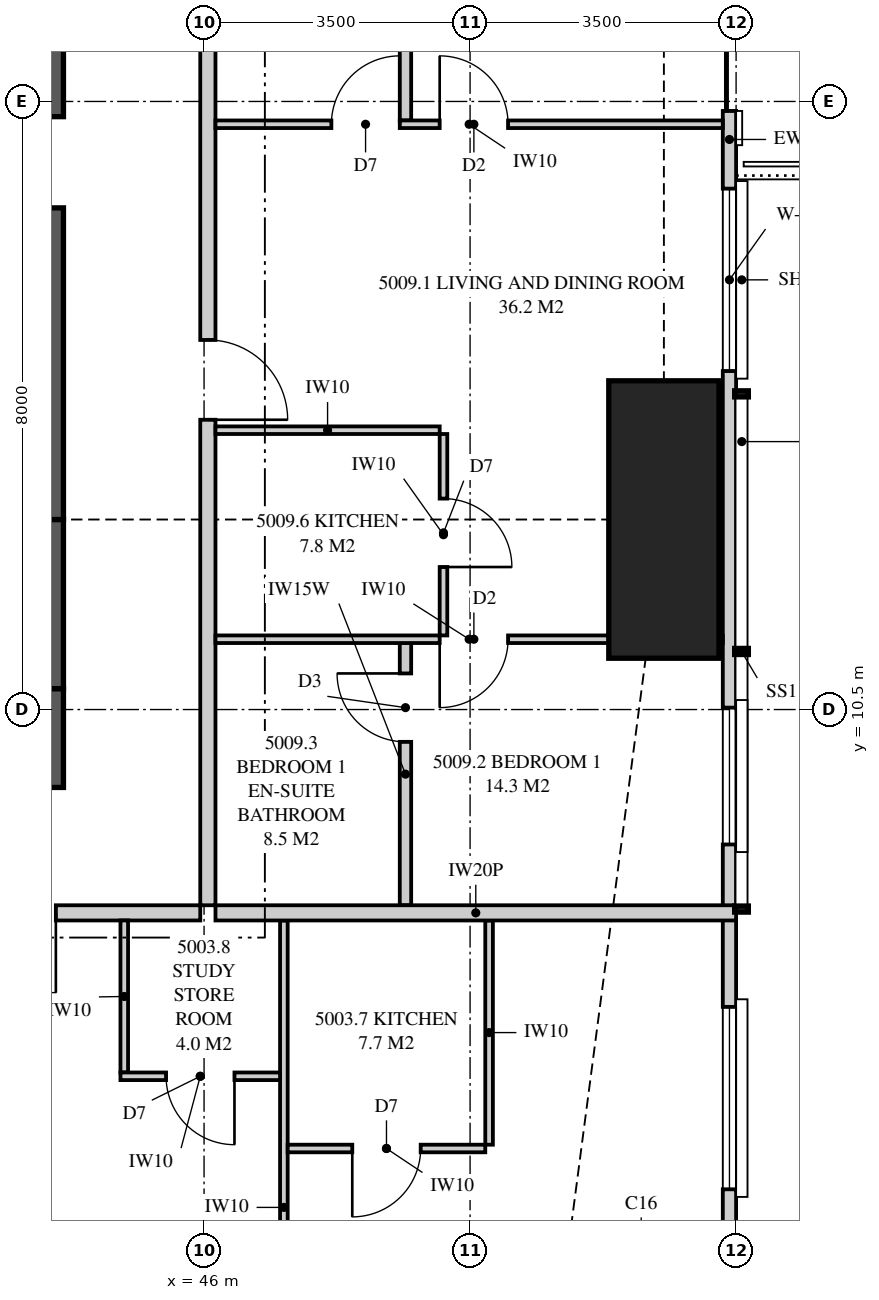
"""IFC4 building model, lengths in metres.
Left out: names, types, materials, properties, quantities, classifications, styles, units other than length and angle.
Written with IfcOpenShell. Run it as: python <this file> out.ifc"""

import sys

from ifc_helpers import new_model, si_unit, direction, frame, frame_2d, origin, origin_2d, place, context, subcontext, project, spatial, polyline, rectangle, outline, extrude, element, fill, save


model = new_model("IFC4")
c1 = context("Model", 3, precision=1e-05, world=origin(), true_north=direction((0.0, 1.0)))
c2 = subcontext(c1, "Body", "Model", "MODEL_VIEW")
j1 = project(units=[si_unit("LENGTHUNIT", "METRE"), si_unit("PLANEANGLEUNIT", "RADIAN")], contexts=[c1])
p1 = place(None, origin())
s1 = spatial("IfcSite", under=j1, at=p1, CompositionType="ELEMENT")
p2 = place(p1, origin())
s2 = spatial("IfcBuilding", under=s1, at=p2, CompositionType="ELEMENT")
p3 = place(p2, frame((0.0, 0.0, 184.5)))
s3 = spatial("IfcBuildingStorey", under=s2, at=p3, CompositionType="ELEMENT", Elevation=184.5)
p4 = place(p3, frame((52.05, 13.0, 0.0), z_axis=(0.0, 0.0, 1.0), x_axis=(1.0, 0.0, 0.0)))
e1 = element("IfcColumn", 1, at=p4, inside=s3, PredefinedType="COLUMN", context=c2, shape_type="SweptSolid", body=[
    extrude(rectangle(XDim=1.45, YDim=3.65, at=origin_2d()), origin(), (0.0, 0.0, 1.0), 3.35),
])
p5 = place(p3, frame((35.9, 10.125, 0.0), z_axis=(0.0, 0.0, 1.0), x_axis=(1.0, 0.0, 0.0)))
e2 = element("IfcWall", 2, at=p5, inside=s3, PredefinedType="SHEAR", context=c2, shape_type="SweptSolid", body=[
    extrude(rectangle(XDim=8.25, YDim=1.3, at=frame_2d((4.125, 0.0))), origin(), (0.0, 0.0, 1.0), 3.35),
])
p6 = place(p5, frame((2.7, 0.0, 0.0)))
e3 = element("IfcOpeningElement", 3, at=p6, cuts=e2, PredefinedType="OPENING", context=c2, shape_type="SweptSolid", body=[
    extrude(rectangle(XDim=1.0, YDim=2.1, at=frame_2d((0.5, 1.05))), frame((0.0, 0.66, 0.0), z_axis=(0.0, -1.0, 0.0), x_axis=(1.0, 0.0, 0.0)), (0.0, 0.0, 1.0), 1.32),
])
p7 = place(p3, frame((43.8, 10.775, 0.0), z_axis=(0.0, 0.0, 1.0), x_axis=(0.0, 1.0, 0.0)))
e4 = element("IfcWall", 4, at=p7, inside=s3, PredefinedType="SHEAR", context=c2, shape_type="SweptSolid", body=[
    extrude(rectangle(XDim=2.225, YDim=0.7, at=frame_2d((1.113, 0.0))), origin(), (0.0, 0.0, 1.0), 3.35),
])
p8 = place(p3, frame((43.8, 13.0, 0.0), z_axis=(0.0, 0.0, 1.0), x_axis=(0.0, 1.0, 0.0)))
e5 = element("IfcWall", 5, at=p8, inside=s3, PredefinedType="SHEAR", context=c2, shape_type="SweptSolid", body=[
    extrude(rectangle(XDim=6.3, YDim=0.7, at=frame_2d((3.15, 0.0))), origin(), (0.0, 0.0, 1.0), 3.35),
])
p9 = place(p8, frame((4.1, 0.0, 0.0)))
e6 = element("IfcOpeningElement", 6, at=p9, cuts=e5, PredefinedType="OPENING", context=c2, shape_type="SweptSolid", body=[
    extrude(rectangle(XDim=1.2, YDim=2.2, at=frame_2d((0.6, 1.1))), frame((0.0, 0.36, 0.0), z_axis=(0.0, -1.0, 0.0), x_axis=(1.0, 0.0, 0.0)), (0.0, 0.0, 1.0), 0.72),
])
p10 = place(p3, frame((52.913, 3.051, 0.0), z_axis=(0.0, 0.0, 1.0), x_axis=(0.0, 1.0, 0.0)))
e7 = element("IfcWall", 7, at=p10, inside=s3, PredefinedType="SOLIDWALL", context=c2, shape_type="SweptSolid", body=[
    extrude(outline(polyline([(0.0, 0.0), (29.897, 0.0), (29.897, 3.11), (22.167, 3.11), (22.167, 2.15), (22.074, 2.15), (22.074, 3.11), (21.949, 3.11), (21.949, 2.15), (9.949, 2.15), (9.949, 3.11), (9.847, 3.11), (9.847, 2.15), (9.706, 2.15), (9.706, 3.11), (0.0, 3.11), (0.0, 0.0)])), frame((0.0, 0.087, 0.0), z_axis=(0.0, -1.0, 0.0), x_axis=(1.0, 0.0, 0.0)), (0.0, 0.0, 1.0), 0.175),
])
p11 = place(p10, frame((1.137, 0.0, 0.4)))
e8 = element("IfcOpeningElement", 8, at=p11, cuts=e7, PredefinedType="OPENING", context=c2, shape_type="SweptSolid", body=[
    extrude(rectangle(XDim=2.4, YDim=1.7, at=frame_2d((1.2, 0.85))), frame((0.0, 0.097, 0.0), z_axis=(0.0, -1.0, 0.0), x_axis=(1.0, 0.0, 0.0)), (0.0, 0.0, 1.0), 0.195),
])
p12 = place(p10, frame((5.674, 0.0, 0.4)))
e9 = element("IfcOpeningElement", 9, at=p12, cuts=e7, PredefinedType="OPENING", context=c2, shape_type="SweptSolid", body=[
    extrude(rectangle(XDim=1.8, YDim=1.7, at=frame_2d((0.9, 0.85))), frame((0.0, 0.097, 0.0), z_axis=(0.0, -1.0, 0.0), x_axis=(1.0, 0.0, 0.0)), (0.0, 0.0, 1.0), 0.195),
])
p13 = place(p10, frame((11.902, 0.0, 0.4)))
e10 = element("IfcOpeningElement", 10, at=p13, cuts=e7, PredefinedType="OPENING", context=c2, shape_type="SweptSolid", body=[
    extrude(rectangle(XDim=2.4, YDim=1.7, at=frame_2d((1.2, 0.85))), frame((0.0, 0.097, 0.0), z_axis=(0.0, -1.0, 0.0), x_axis=(1.0, 0.0, 0.0)), (0.0, 0.0, 1.0), 0.195),
])
p14 = place(p10, frame((15.324, 0.0, 0.0)))
e11 = element("IfcOpeningElement", 11, at=p14, cuts=e7, PredefinedType="OPENING", context=c2, shape_type="SweptSolid", body=[
    extrude(rectangle(XDim=1.8, YDim=2.1, at=frame_2d((0.9, 1.05))), frame((0.0, 0.097, 0.0), z_axis=(0.0, -1.0, 0.0), x_axis=(1.0, 0.0, 0.0)), (0.0, 0.0, 1.0), 0.195),
])
p15 = place(p10, frame((23.874, 0.0, 0.4)))
e12 = element("IfcOpeningElement", 12, at=p15, cuts=e7, PredefinedType="OPENING", context=c2, shape_type="SweptSolid", body=[
    extrude(rectangle(XDim=1.8, YDim=1.7, at=frame_2d((0.9, 0.85))), frame((0.0, 0.097, 0.0), z_axis=(0.0, -1.0, 0.0), x_axis=(1.0, 0.0, 0.0)), (0.0, 0.0, 1.0), 0.195),
])
p16 = place(p10, frame((26.871, 0.0, 0.4)))
e13 = element("IfcOpeningElement", 13, at=p16, cuts=e7, PredefinedType="OPENING", context=c2, shape_type="SweptSolid", body=[
    extrude(rectangle(XDim=1.8, YDim=1.7, at=frame_2d((0.9, 0.85))), frame((0.0, 0.097, 0.0), z_axis=(0.0, -1.0, 0.0), x_axis=(1.0, 0.0, 0.0)), (0.0, 0.0, 1.0), 0.195),
])
p17 = place(p3, frame((34.1, 7.825, 0.0), z_axis=(0.0, 0.0, 1.0), x_axis=(1.0, 0.0, 0.0)))
e14 = element("IfcWall", 14, at=p17, inside=s3, PredefinedType="PARTITIONING", context=c2, shape_type="SweptSolid", body=[
    extrude(outline(polyline([(0.0, 0.0), (11.85, 0.0), (11.85, 3.11), (8.987, 3.11), (8.987, 2.541), (8.312, 2.541), (8.312, 3.11), (0.0, 3.11), (0.0, 0.0)])), frame((0.0, 0.1, 0.0), z_axis=(0.0, -1.0, 0.0), x_axis=(1.0, 0.0, 0.0)), (0.0, 0.0, 1.0), 0.2),
])
p18 = place(p17, frame((8.9, 0.0, 0.0)))
e15 = element("IfcOpeningElement", 15, at=p18, cuts=e14, PredefinedType="OPENING", context=c2, shape_type="SweptSolid", body=[
    extrude(rectangle(XDim=1.05, YDim=2.2, at=frame_2d((0.525, 1.1))), frame((0.0, 0.11, 0.0), z_axis=(0.0, -1.0, 0.0), x_axis=(1.0, 0.0, 0.0)), (0.0, 0.0, 1.0), 0.22),
])
p19 = place(p3, frame((47.05, 0.175, 0.0), z_axis=(0.0, 0.0, 1.0), x_axis=(0.0, 1.0, 0.0)))
e16 = element("IfcWall", 16, at=p19, inside=s3, PredefinedType="PARTITIONING", context=c2, shape_type="SweptSolid", body=[
    extrude(outline(polyline([(0.0, 0.0), (7.55, 0.0), (7.55, 3.11), (2.409, 3.11), (2.409, 2.15), (0.663, 2.15), (0.663, 3.11), (0.0, 3.11), (0.0, 0.0)])), frame((0.0, 0.05, 0.0), z_axis=(0.0, -1.0, 0.0), x_axis=(1.0, 0.0, 0.0)), (0.0, 0.0, 1.0), 0.1),
])
p20 = place(p19, frame((1.825, 0.0, 0.0)))
e17 = element("IfcOpeningElement", 17, at=p20, cuts=e16, PredefinedType="OPENING", context=c2, shape_type="SweptSolid", body=[
    extrude(rectangle(XDim=0.9, YDim=2.1, at=frame_2d((0.45, 1.05))), frame((0.0, 0.06, 0.0), z_axis=(0.0, -1.0, 0.0), x_axis=(1.0, 0.0, 0.0)), (0.0, 0.0, 1.0), 0.12),
])
p21 = place(p3, frame((47.1, 4.725, 0.0), z_axis=(0.0, 0.0, 1.0), x_axis=(1.0, 0.0, 0.0)))
e18 = element("IfcWall", 18, at=p21, inside=s3, PredefinedType="PARTITIONING", context=c2, shape_type="SweptSolid", body=[
    extrude(rectangle(XDim=2.6, YDim=0.1, at=frame_2d((1.3, 0.0))), origin(), (0.0, 0.0, 1.0), 3.11),
])
p22 = place(p21, frame((0.85, 0.0, 0.0)))
e19 = element("IfcOpeningElement", 19, at=p22, cuts=e18, PredefinedType="OPENING", context=c2, shape_type="SweptSolid", body=[
    extrude(rectangle(XDim=0.9, YDim=2.1, at=frame_2d((0.45, 1.05))), frame((0.0, 0.06, 0.0), z_axis=(0.0, -1.0, 0.0), x_axis=(1.0, 0.0, 0.0)), (0.0, 0.0, 1.0), 0.12),
])
p23 = place(p3, frame((49.75, 4.775, 0.0), z_axis=(0.0, 0.0, 1.0), x_axis=(0.0, 1.0, 0.0)))
e20 = element("IfcWall", 20, at=p23, inside=s3, PredefinedType="PARTITIONING", context=c2, shape_type="SweptSolid", body=[
    extrude(rectangle(XDim=2.95, YDim=0.1, at=frame_2d((1.475, 0.0))), origin(), (0.0, 0.0, 1.0), 3.11),
])
p24 = place(p3, frame((46.15, 7.825, 0.0), z_axis=(0.0, 0.0, 1.0), x_axis=(1.0, 0.0, 0.0)))
e21 = element("IfcWall", 21, at=p24, inside=s3, PredefinedType="PARTITIONING", context=c2, shape_type="SweptSolid", body=[
    extrude(outline(polyline([(0.0, 0.0), (6.85, 0.0), (6.85, 3.11), (6.138, 3.11), (6.138, 2.15), (4.303, 2.15), (4.303, 3.11), (0.0, 3.11), (0.0, 0.0)])), frame((0.0, 0.1, 0.0), z_axis=(0.0, -1.0, 0.0), x_axis=(1.0, 0.0, 0.0)), (0.0, 0.0, 1.0), 0.2),
])
p25 = place(p3, frame((46.05, 7.925, 0.0), z_axis=(0.0, 0.0, 1.0), x_axis=(0.0, 1.0, 0.0)))
e22 = element("IfcWall", 22, at=p25, inside=s3, PredefinedType="PARTITIONING", context=c2, shape_type="SweptSolid", body=[
    extrude(outline(polyline([(0.0, 0.0), (13.775, 0.0), (13.775, 3.11), (5.412, 3.11), (5.412, 2.541), (4.738, 2.541), (4.738, 3.11), (0.0, 3.11), (0.0, 0.0)])), frame((0.0, 0.1, 0.0), z_axis=(0.0, -1.0, 0.0), x_axis=(1.0, 0.0, 0.0)), (0.0, 0.0, 1.0), 0.2),
])
p26 = place(p25, frame((6.387, 0.0, 0.0)))
e23 = element("IfcOpeningElement", 23, at=p26, cuts=e22, PredefinedType="OPENING", context=c2, shape_type="SweptSolid", body=[
    extrude(rectangle(XDim=1.05, YDim=2.2, at=frame_2d((0.525, 1.1))), frame((0.0, 0.11, 0.0), z_axis=(0.0, -1.0, 0.0), x_axis=(1.0, 0.0, 0.0)), (0.0, 0.0, 1.0), 0.22),
])
p27 = place(p3, frame((52.825, 11.425, 0.0), z_axis=(0.0, 0.0, 1.0), x_axis=(-1.0, 0.0, 0.0)))
e24 = element("IfcWall", 24, at=p27, inside=s3, PredefinedType="PARTITIONING", context=c2, shape_type="SweptSolid", body=[
    extrude(outline(polyline([(0.0, 0.0), (6.675, 0.0), (6.675, 3.11), (1.849, 3.11), (1.849, 2.15), (0.115, 2.15), (0.115, 3.11), (0.0, 3.11), (0.0, 0.0)])), frame((0.0, 0.05, 0.0), z_axis=(0.0, -1.0, 0.0), x_axis=(1.0, 0.0, 0.0)), (0.0, 0.0, 1.0), 0.1),
])
p28 = place(p27, frame((2.825, 0.0, 0.0)))
e25 = element("IfcOpeningElement", 25, at=p28, cuts=e24, PredefinedType="OPENING", context=c2, shape_type="SweptSolid", body=[
    extrude(rectangle(XDim=0.9, YDim=2.1, at=frame_2d((0.45, 1.05))), frame((0.0, 0.06, 0.0), z_axis=(0.0, -1.0, 0.0), x_axis=(1.0, 0.0, 0.0)), (0.0, 0.0, 1.0), 0.12),
])
p29 = place(p3, frame((52.825, 18.2, 0.0), z_axis=(0.0, 0.0, 1.0), x_axis=(-1.0, 0.0, 0.0)))
e26 = element("IfcWall", 26, at=p29, inside=s3, PredefinedType="PARTITIONING", context=c2, shape_type="SweptSolid", body=[
    extrude(outline(polyline([(0.0, 0.0), (6.675, 0.0), (6.675, 3.11), (1.635, 3.11), (1.635, 2.15), (0.0, 2.15), (0.0, 3.11), (0.0, 0.0)])), frame((0.0, 0.05, 0.0), z_axis=(0.0, -1.0, 0.0), x_axis=(1.0, 0.0, 0.0)), (0.0, 0.0, 1.0), 0.1),
])
p30 = place(p29, frame((2.825, 0.0, 0.0)))
e27 = element("IfcOpeningElement", 27, at=p30, cuts=e26, PredefinedType="OPENING", context=c2, shape_type="SweptSolid", body=[
    extrude(rectangle(XDim=0.9, YDim=2.1, at=frame_2d((0.45, 1.05))), frame((0.0, 0.06, 0.0), z_axis=(0.0, -1.0, 0.0), x_axis=(1.0, 0.0, 0.0)), (0.0, 0.0, 1.0), 0.12),
])
p31 = place(p29, frame((4.25, 0.0, 0.0)))
e28 = element("IfcOpeningElement", 28, at=p31, cuts=e26, PredefinedType="OPENING", context=c2, shape_type="SweptSolid", body=[
    extrude(rectangle(XDim=0.9, YDim=2.1, at=frame_2d((0.45, 1.05))), frame((0.0, 0.06, 0.0), z_axis=(0.0, -1.0, 0.0), x_axis=(1.0, 0.0, 0.0)), (0.0, 0.0, 1.0), 0.12),
])
p32 = place(p3, frame((48.65, 7.925, 0.0), z_axis=(0.0, 0.0, 1.0), x_axis=(0.0, 1.0, 0.0)))
e29 = element("IfcWall", 29, at=p32, inside=s3, PredefinedType="PLUMBINGWALL", context=c2, shape_type="SweptSolid", body=[
    extrude(rectangle(XDim=3.45, YDim=0.15, at=frame_2d((1.725, 0.0))), origin(), (0.0, 0.0, 1.0), 3.11),
])
p33 = place(p32, frame((2.15, 0.0, 0.0)))
e30 = element("IfcOpeningElement", 30, at=p33, cuts=e29, PredefinedType="OPENING", context=c2, shape_type="SweptSolid", body=[
    extrude(rectangle(XDim=0.9, YDim=2.1, at=frame_2d((0.45, 1.05))), frame((0.0, 0.085, 0.0), z_axis=(0.0, -1.0, 0.0), x_axis=(1.0, 0.0, 0.0)), (0.0, 0.0, 1.0), 0.17),
])
p34 = place(p3, frame((48.65, 18.25, 0.0), z_axis=(0.0, 0.0, 1.0), x_axis=(0.0, 1.0, 0.0)))
e31 = element("IfcWall", 31, at=p34, inside=s3, PredefinedType="PLUMBINGWALL", context=c2, shape_type="SweptSolid", body=[
    extrude(rectangle(XDim=3.45, YDim=0.15, at=frame_2d((1.725, 0.0))), origin(), (0.0, 0.0, 1.0), 3.11),
])
p35 = place(p3, frame((49.15, 11.475, 0.0), z_axis=(0.0, 0.0, 1.0), x_axis=(0.0, 1.0, 0.0)))
e32 = element("IfcWall", 32, at=p35, inside=s3, PredefinedType="PARTITIONING", context=c2, shape_type="SweptSolid", body=[
    extrude(outline(polyline([(0.0, 0.0), (2.65, 0.0), (2.65, 3.11), (1.812, 3.11), (1.812, 2.541), (1.238, 2.541), (1.238, 3.11), (0.0, 3.11), (0.0, 0.0)])), frame((0.0, 0.05, 0.0), z_axis=(0.0, -1.0, 0.0), x_axis=(1.0, 0.0, 0.0)), (0.0, 0.0, 1.0), 0.1),
])
p36 = place(p35, frame((0.9, 0.0, 0.0)))
e33 = element("IfcOpeningElement", 33, at=p36, cuts=e32, PredefinedType="OPENING", context=c2, shape_type="SweptSolid", body=[
    extrude(rectangle(XDim=0.9, YDim=2.1, at=frame_2d((0.45, 1.05))), frame((0.0, 0.06, 0.0), z_axis=(0.0, -1.0, 0.0), x_axis=(1.0, 0.0, 0.0)), (0.0, 0.0, 1.0), 0.12),
])
p37 = place(p3, frame((49.1, 14.175, 0.0), z_axis=(0.0, 0.0, 1.0), x_axis=(-1.0, 0.0, 0.0)))
e34 = element("IfcWall", 34, at=p37, inside=s3, PredefinedType="PARTITIONING", context=c2, shape_type="SweptSolid", body=[
    extrude(rectangle(XDim=2.95, YDim=0.1, at=frame_2d((1.475, 0.0))), origin(), (0.0, 0.0, 1.0), 3.11),
])
p38 = place(p3, frame((47.0, 5.675, 0.0), z_axis=(0.0, 0.0, 1.0), x_axis=(-1.0, 0.0, 0.0)))
e35 = element("IfcWall", 35, at=p38, inside=s3, PredefinedType="PARTITIONING", context=c2, shape_type="SweptSolid", body=[
    extrude(rectangle(XDim=2.1, YDim=0.1, at=frame_2d((1.05, 0.0))), origin(), (0.0, 0.0, 1.0), 3.11),
])
p39 = place(p38, frame((0.6, 0.0, 0.0)))
e36 = element("IfcOpeningElement", 36, at=p39, cuts=e35, PredefinedType="OPENING", context=c2, shape_type="SweptSolid", body=[
    extrude(rectangle(XDim=0.9, YDim=2.1, at=frame_2d((0.45, 1.05))), frame((0.0, 0.06, 0.0), z_axis=(0.0, -1.0, 0.0), x_axis=(1.0, 0.0, 0.0)), (0.0, 0.0, 1.0), 0.12),
])
p40 = place(p3, frame((44.95, 7.725, 0.0), z_axis=(0.0, 0.0, 1.0), x_axis=(0.0, -1.0, 0.0)))
e37 = element("IfcWall", 37, at=p40, inside=s3, PredefinedType="PARTITIONING", context=c2, shape_type="SweptSolid", body=[
    extrude(rectangle(XDim=2.0, YDim=0.1, at=frame_2d((1.0, 0.0))), origin(), (0.0, 0.0, 1.0), 3.11),
])
p41 = place(p11, origin())
e38 = element("IfcWindow", 38, at=p41, inside=s3, PartitioningType="SINGLE_PANEL", PredefinedType="WINDOW", context=c2, shape_type="SweptSolid", body=[
    extrude(rectangle(XDim=2.4, YDim=1.7, at=frame_2d((1.2, 0.85))), frame((0.0, 0.03, 0.0), z_axis=(0.0, -1.0, 0.0), x_axis=(1.0, 0.0, 0.0)), (0.0, 0.0, 1.0), 0.06),
])
fill(e8, e38)
p42 = place(p12, origin())
e39 = element("IfcWindow", 39, at=p42, inside=s3, PartitioningType="SINGLE_PANEL", PredefinedType="WINDOW", context=c2, shape_type="SweptSolid", body=[
    extrude(rectangle(XDim=1.8, YDim=1.7, at=frame_2d((0.9, 0.85))), frame((0.0, 0.03, 0.0), z_axis=(0.0, -1.0, 0.0), x_axis=(1.0, 0.0, 0.0)), (0.0, 0.0, 1.0), 0.06),
])
fill(e9, e39)
p43 = place(p13, origin())
e40 = element("IfcWindow", 40, at=p43, inside=s3, PartitioningType="SINGLE_PANEL", PredefinedType="WINDOW", context=c2, shape_type="SweptSolid", body=[
    extrude(rectangle(XDim=2.4, YDim=1.7, at=frame_2d((1.2, 0.85))), frame((0.0, 0.03, 0.0), z_axis=(0.0, -1.0, 0.0), x_axis=(1.0, 0.0, 0.0)), (0.0, 0.0, 1.0), 0.06),
])
fill(e10, e40)
p44 = place(p14, origin())
e41 = element("IfcDoor", 41, at=p44, inside=s3, OperationType="SLIDING_TO_LEFT", PredefinedType="DOOR", context=c2, shape_type="SweptSolid", body=[
    extrude(rectangle(XDim=1.8, YDim=2.1, at=frame_2d((0.9, 1.05))), frame((0.0, 0.025, 0.0), z_axis=(0.0, -1.0, 0.0), x_axis=(1.0, 0.0, 0.0)), (0.0, 0.0, 1.0), 0.05),
])
fill(e11, e41)
p45 = place(p18, frame((1.05, 0.0, 0.0), z_axis=(0.0, 0.0, 1.0), x_axis=(-1.0, 0.0, 0.0)))
e42 = element("IfcDoor", 42, at=p45, inside=s3, OperationType="SINGLE_SWING_LEFT", PredefinedType="DOOR", context=c2, shape_type="SweptSolid", body=[
    extrude(rectangle(XDim=1.05, YDim=2.2, at=frame_2d((0.525, 1.1))), frame((0.0, 0.025, 0.0), z_axis=(0.0, -1.0, 0.0), x_axis=(1.0, 0.0, 0.0)), (0.0, 0.0, 1.0), 0.05),
])
fill(e15, e42)
p46 = place(p22, frame((0.9, 0.0, 0.0), z_axis=(0.0, 0.0, 1.0), x_axis=(-1.0, 0.0, 0.0)))
e43 = element("IfcDoor", 43, at=p46, inside=s3, OperationType="SINGLE_SWING_RIGHT", PredefinedType="DOOR", context=c2, shape_type="SweptSolid", body=[
    extrude(rectangle(XDim=0.9, YDim=2.1, at=frame_2d((0.45, 1.05))), frame((0.0, 0.025, 0.0), z_axis=(0.0, -1.0, 0.0), x_axis=(1.0, 0.0, 0.0)), (0.0, 0.0, 1.0), 0.05),
])
fill(e19, e43)
p47 = place(p26, frame((1.05, 0.0, 0.0), z_axis=(0.0, 0.0, 1.0), x_axis=(-1.0, 0.0, 0.0)))
e44 = element("IfcDoor", 44, at=p47, inside=s3, OperationType="SINGLE_SWING_RIGHT", PredefinedType="DOOR", context=c2, shape_type="SweptSolid", body=[
    extrude(rectangle(XDim=1.05, YDim=2.2, at=frame_2d((0.525, 1.1))), frame((0.0, 0.025, 0.0), z_axis=(0.0, -1.0, 0.0), x_axis=(1.0, 0.0, 0.0)), (0.0, 0.0, 1.0), 0.05),
])
fill(e23, e44)
p48 = place(p28, origin())
e45 = element("IfcDoor", 45, at=p48, inside=s3, OperationType="SINGLE_SWING_RIGHT", PredefinedType="DOOR", context=c2, shape_type="SweptSolid", body=[
    extrude(rectangle(XDim=0.9, YDim=2.1, at=frame_2d((0.45, 1.05))), frame((0.0, 0.025, 0.0), z_axis=(0.0, -1.0, 0.0), x_axis=(1.0, 0.0, 0.0)), (0.0, 0.0, 1.0), 0.05),
])
fill(e25, e45)
p49 = place(p33, origin())
e46 = element("IfcDoor", 46, at=p49, inside=s3, OperationType="SINGLE_SWING_RIGHT", PredefinedType="DOOR", context=c2, shape_type="SweptSolid", body=[
    extrude(rectangle(XDim=0.9, YDim=2.1, at=frame_2d((0.45, 1.05))), frame((0.0, 0.025, 0.0), z_axis=(0.0, -1.0, 0.0), x_axis=(1.0, 0.0, 0.0)), (0.0, 0.0, 1.0), 0.05),
])
fill(e30, e46)
p50 = place(p30, frame((0.9, 0.0, 0.0), z_axis=(0.0, 0.0, 1.0), x_axis=(-1.0, 0.0, 0.0)))
e47 = element("IfcDoor", 47, at=p50, inside=s3, OperationType="SINGLE_SWING_LEFT", PredefinedType="DOOR", context=c2, shape_type="SweptSolid", body=[
    extrude(rectangle(XDim=0.9, YDim=2.1, at=frame_2d((0.45, 1.05))), frame((0.0, 0.025, 0.0), z_axis=(0.0, -1.0, 0.0), x_axis=(1.0, 0.0, 0.0)), (0.0, 0.0, 1.0), 0.05),
])
fill(e27, e47)
p51 = place(p31, frame((0.9, 0.0, 0.0), z_axis=(0.0, 0.0, 1.0), x_axis=(-1.0, 0.0, 0.0)))
e48 = element("IfcDoor", 48, at=p51, inside=s3, OperationType="SINGLE_SWING_RIGHT", PredefinedType="DOOR", context=c2, shape_type="SweptSolid", body=[
    extrude(rectangle(XDim=0.9, YDim=2.1, at=frame_2d((0.45, 1.05))), frame((0.0, 0.025, 0.0), z_axis=(0.0, -1.0, 0.0), x_axis=(1.0, 0.0, 0.0)), (0.0, 0.0, 1.0), 0.05),
])
fill(e28, e48)
p52 = place(p36, frame((0.9, 0.0, 0.0), z_axis=(0.0, 0.0, 1.0), x_axis=(-1.0, 0.0, 0.0)))
e49 = element("IfcDoor", 49, at=p52, inside=s3, OperationType="SINGLE_SWING_RIGHT", PredefinedType="DOOR", context=c2, shape_type="SweptSolid", body=[
    extrude(rectangle(XDim=0.9, YDim=2.1, at=frame_2d((0.45, 1.05))), frame((0.0, 0.025, 0.0), z_axis=(0.0, -1.0, 0.0), x_axis=(1.0, 0.0, 0.0)), (0.0, 0.0, 1.0), 0.05),
])
fill(e33, e49)
p53 = place(p39, origin())
e50 = element("IfcDoor", 50, at=p53, inside=s3, OperationType="SINGLE_SWING_LEFT", PredefinedType="DOOR", context=c2, shape_type="SweptSolid", body=[
    extrude(rectangle(XDim=0.9, YDim=2.1, at=frame_2d((0.45, 1.05))), frame((0.0, 0.025, 0.0), z_axis=(0.0, -1.0, 0.0), x_axis=(1.0, 0.0, 0.0)), (0.0, 0.0, 1.0), 0.05),
])
fill(e36, e50)
save(model, sys.argv[1])
